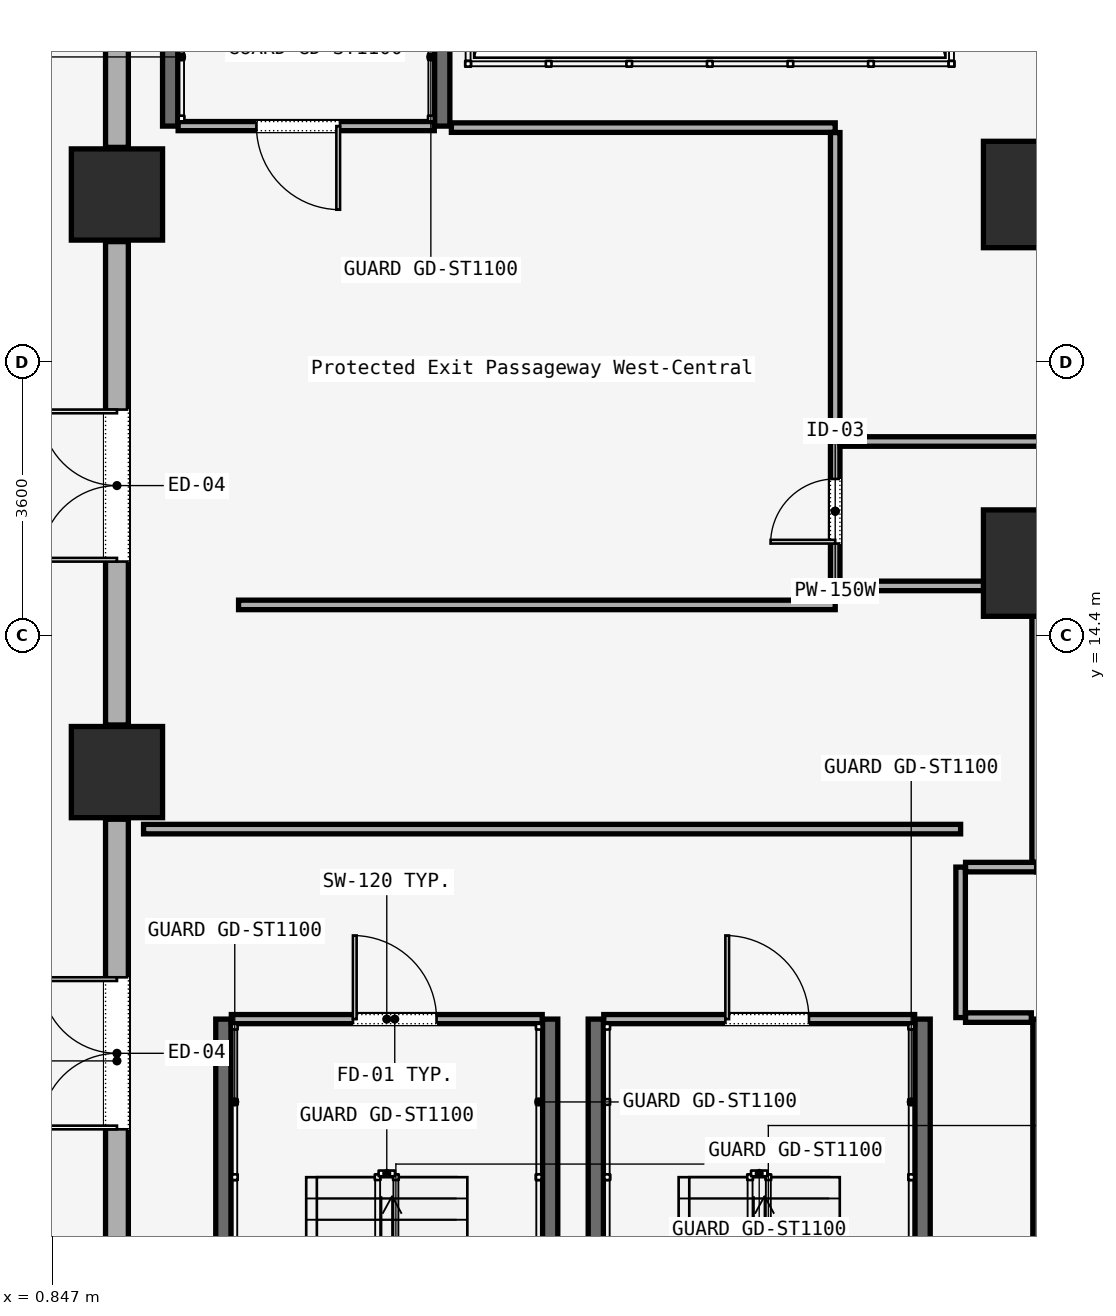
"""IFC4 building model, lengths in metres.
Left out: names, types, materials, properties, quantities, classifications, styles, units other than length and angle.
Written with IfcOpenShell. Run it as: python <this file> out.ifc"""

import sys

from ifc_helpers import new_model, si_unit, direction, frame, frame_2d, origin, origin_2d, place, context, subcontext, project, spatial, rectangle, extrude, element, fill, save


model = new_model("IFC4")
c1 = context("Model", 3, precision=1e-05, world=origin(), true_north=direction((0.0, 1.0)))
c2 = subcontext(c1, "Body", "Model", "MODEL_VIEW")
j1 = project(units=[si_unit("LENGTHUNIT", "METRE"), si_unit("PLANEANGLEUNIT", "RADIAN")], contexts=[c1])
p1 = place(None, origin())
s1 = spatial("IfcSite", under=j1, at=p1, CompositionType="ELEMENT")
p2 = place(p1, origin())
s2 = spatial("IfcBuilding", under=s1, at=p2, CompositionType="ELEMENT")
p3 = place(p2, origin())
s3 = spatial("IfcBuildingStorey", under=s2, at=p3, CompositionType="ELEMENT", Elevation=0.0)
for number, where, z_axis, x_axis in (
    (1, (1.7, 12.6, 0.0), (0.0, 0.0, 1.0), (1.0, 0.0, 0.0)),
    (2, (1.7, 20.2, 0.0), (0.0, 0.0, 1.0), (1.0, 0.0, 0.0)),
):
    element("IfcColumn", number, at=place(p3, frame(where, z_axis=z_axis, x_axis=x_axis)), inside=s3, PredefinedType="COLUMN", context=c2, shape_type="SweptSolid", body=[
        extrude(rectangle(XDim=1.2, YDim=1.2, at=origin_2d()), origin(), (0.0, 0.0, 1.0), 5.7),
    ])
for number, where, z_axis, x_axis in (
    (3, (13.8, 15.35, 0.0), (0.0, 0.0, 1.0), (1.0, 0.0, 0.0)),
    (4, (13.8, 20.2, 0.0), (0.0, 0.0, 1.0), (1.0, 0.0, 0.0)),
):
    element("IfcColumn", number, at=place(p3, frame(where, z_axis=z_axis, x_axis=x_axis)), inside=s3, PredefinedType="COLUMN", context=c2, shape_type="SweptSolid", body=[
        extrude(rectangle(XDim=1.4, YDim=1.4, at=origin_2d()), origin(), (0.0, 0.0, 1.0), 5.7),
    ])
p4 = place(p3, frame((1.7, 5.62, 0.0), z_axis=(0.0, 0.0, 1.0), x_axis=(0.0, 1.0, 0.0)))
e5 = element("IfcWall", 5, at=p4, inside=s3, PredefinedType="SOLIDWALL", context=c2, shape_type="SweptSolid", body=[
    extrude(rectangle(XDim=6.36, YDim=0.3, at=frame_2d((3.18, 0.0))), origin(), (0.0, 0.0, 1.0), 5.7),
])
p5 = place(p4, frame((2.28, 0.0, 0.0)))
e6 = element("IfcOpeningElement", 6, at=p5, cuts=e5, PredefinedType="OPENING", context=c2, shape_type="SweptSolid", body=[
    extrude(rectangle(XDim=2.0, YDim=2.3, at=frame_2d((1.0, 1.15))), frame((0.0, 0.15, 0.0), z_axis=(0.0, -1.0, 0.0), x_axis=(1.0, 0.0, 0.0)), (0.0, 0.0, 1.0), 0.3),
])
p6 = place(p3, frame((1.7, 13.22, 0.0), z_axis=(0.0, 0.0, 1.0), x_axis=(0.0, 1.0, 0.0)))
e7 = element("IfcWall", 7, at=p6, inside=s3, PredefinedType="SOLIDWALL", context=c2, shape_type="SweptSolid", body=[
    extrude(rectangle(XDim=6.36, YDim=0.3, at=frame_2d((3.18, 0.0))), origin(), (0.0, 0.0, 1.0), 5.7),
])
p7 = place(p6, frame((2.15, 0.0, 0.0)))
e8 = element("IfcOpeningElement", 8, at=p7, cuts=e7, PredefinedType="OPENING", context=c2, shape_type="SweptSolid", body=[
    extrude(rectangle(XDim=2.0, YDim=2.3, at=frame_2d((1.0, 1.15))), frame((0.0, 0.15, 0.0), z_axis=(0.0, -1.0, 0.0), x_axis=(1.0, 0.0, 0.0)), (0.0, 0.0, 1.0), 0.3),
])
p8 = place(p3, frame((1.7, 20.82, 0.0), z_axis=(0.0, 0.0, 1.0), x_axis=(0.0, 1.0, 0.0)))
e9 = element("IfcWall", 9, at=p8, inside=s3, PredefinedType="SOLIDWALL", context=c2, shape_type="SweptSolid", body=[
    extrude(rectangle(XDim=6.36, YDim=0.3, at=frame_2d((3.18, 0.0))), origin(), (0.0, 0.0, 1.0), 5.7),
])
for number, where, z_axis, x_axis in (
    (10, (3.1, 9.35, -0.4), (0.0, 0.0, 1.0), (0.0, -1.0, 0.0)),
    (11, (7.4, 9.35, -0.4), (0.0, 0.0, 1.0), (0.0, -1.0, 0.0)),
):
    element("IfcWall", number, at=place(p3, frame(where, z_axis=z_axis, x_axis=x_axis)), inside=s3, PredefinedType="SOLIDWALL", context=c2, shape_type="SweptSolid", body=[
        extrude(rectangle(XDim=8.5, YDim=0.2, at=frame_2d((4.25, 0.0))), origin(), (0.0, 0.0, 1.0), 6.4),
    ])
p9 = place(p3, frame((3.205, 9.35, 0.0), z_axis=(0.0, 0.0, 1.0), x_axis=(1.0, 0.0, 0.0)))
e12 = element("IfcWall", 12, at=p9, inside=s3, PredefinedType="SOLIDWALL", context=c2, shape_type="SweptSolid", body=[
    extrude(rectangle(XDim=4.09, YDim=0.12, at=frame_2d((2.045, 0.0))), origin(), (0.0, 0.0, 1.0), 3.6),
])
p10 = place(p9, frame((1.6, 0.0, 0.0)))
e13 = element("IfcOpeningElement", 13, at=p10, cuts=e12, PredefinedType="OPENING", context=c2, shape_type="SweptSolid", body=[
    extrude(rectangle(XDim=1.1, YDim=2.2, at=frame_2d((0.55, 1.1))), frame((0.0, 0.06, 0.0), z_axis=(0.0, -1.0, 0.0), x_axis=(1.0, 0.0, 0.0)), (0.0, 0.0, 1.0), 0.12),
])
for number, where, z_axis, x_axis in (
    (14, (8.0, 9.35, -0.4), (0.0, 0.0, 1.0), (0.0, -1.0, 0.0)),
    (15, (12.3, 9.35, -0.4), (0.0, 0.0, 1.0), (0.0, -1.0, 0.0)),
):
    element("IfcWall", number, at=place(p3, frame(where, z_axis=z_axis, x_axis=x_axis)), inside=s3, PredefinedType="SOLIDWALL", context=c2, shape_type="SweptSolid", body=[
        extrude(rectangle(XDim=8.5, YDim=0.2, at=frame_2d((4.25, 0.0))), origin(), (0.0, 0.0, 1.0), 6.4),
    ])
p11 = place(p3, frame((8.105, 9.35, 0.0), z_axis=(0.0, 0.0, 1.0), x_axis=(1.0, 0.0, 0.0)))
e16 = element("IfcWall", 16, at=p11, inside=s3, PredefinedType="SOLIDWALL", context=c2, shape_type="SweptSolid", body=[
    extrude(rectangle(XDim=4.09, YDim=0.12, at=frame_2d((2.045, 0.0))), origin(), (0.0, 0.0, 1.0), 3.6),
])
p12 = place(p11, frame((1.6, 0.0, 0.0)))
e17 = element("IfcOpeningElement", 17, at=p12, cuts=e16, PredefinedType="OPENING", context=c2, shape_type="SweptSolid", body=[
    extrude(rectangle(XDim=1.1, YDim=2.2, at=frame_2d((0.55, 1.1))), frame((0.0, 0.06, 0.0), z_axis=(0.0, -1.0, 0.0), x_axis=(1.0, 0.0, 0.0)), (0.0, 0.0, 1.0), 0.12),
])
p13 = place(p3, frame((13.85, 9.35, -0.4), z_axis=(0.0, 0.0, 1.0), x_axis=(0.0, -1.0, 0.0)))
e18 = element("IfcWall", 18, at=p13, inside=s3, PredefinedType="SOLIDWALL", context=c2, shape_type="SweptSolid", body=[
    extrude(rectangle(XDim=8.5, YDim=0.2, at=frame_2d((4.25, 0.0))), origin(), (0.0, 0.0, 1.0), 6.4),
])
for number, where, z_axis, x_axis in (
    (19, (5.98, 21.1, -0.4), (0.0, 0.0, 1.0), (0.0, 1.0, 0.0)),
    (20, (2.4, 21.1, -0.4), (0.0, 0.0, 1.0), (0.0, 1.0, 0.0)),
):
    element("IfcWall", number, at=place(p3, frame(where, z_axis=z_axis, x_axis=x_axis)), inside=s3, PredefinedType="SOLIDWALL", context=c2, shape_type="SweptSolid", body=[
        extrude(rectangle(XDim=7.95, YDim=0.2, at=frame_2d((3.975, 0.0))), origin(), (0.0, 0.0, 1.0), 6.4),
    ])
p14 = place(p3, frame((5.875, 21.1, 0.0), z_axis=(0.0, 0.0, 1.0), x_axis=(-1.0, 0.0, 0.0)))
e21 = element("IfcWall", 21, at=p14, inside=s3, PredefinedType="SOLIDWALL", context=c2, shape_type="SweptSolid", body=[
    extrude(rectangle(XDim=3.37, YDim=0.12, at=frame_2d((1.685, 0.0))), origin(), (0.0, 0.0, 1.0), 3.6),
])
p15 = place(p14, frame((1.24, 0.0, 0.0)))
e22 = element("IfcOpeningElement", 22, at=p15, cuts=e21, PredefinedType="OPENING", context=c2, shape_type="SweptSolid", body=[
    extrude(rectangle(XDim=1.1, YDim=2.2, at=frame_2d((0.55, 1.1))), frame((0.0, 0.06, 0.0), z_axis=(0.0, -1.0, 0.0), x_axis=(1.0, 0.0, 0.0)), (0.0, 0.0, 1.0), 0.12),
])
p16 = place(p3, frame((13.8, 15.05, 0.0), z_axis=(0.0, 0.0, 1.0), x_axis=(-1.0, 0.0, 0.0)))
e23 = element("IfcWall", 23, at=p16, inside=s3, PredefinedType="PARTITIONING", context=c2, shape_type="SweptSolid", body=[
    extrude(rectangle(XDim=2.65, YDim=0.125, at=frame_2d((1.325, 0.0))), origin(), (0.0, 0.0, 1.0), 3.6),
])
p17 = place(p3, frame((11.15, 15.115, 0.0), z_axis=(0.0, 0.0, 1.0), x_axis=(0.0, 1.0, 0.0)))
e24 = element("IfcWall", 24, at=p17, inside=s3, PredefinedType="PARTITIONING", context=c2, shape_type="SweptSolid", body=[
    extrude(rectangle(XDim=1.835, YDim=0.125, at=frame_2d((0.917, 0.0))), origin(), (0.0, 0.0, 1.0), 3.6),
])
p18 = place(p17, frame((0.492, 0.0, 0.0)))
e25 = element("IfcOpeningElement", 25, at=p18, cuts=e24, PredefinedType="OPENING", context=c2, shape_type="SweptSolid", body=[
    extrude(rectangle(XDim=0.85, YDim=2.15, at=frame_2d((0.425, 1.075))), frame((0.0, 0.062, 0.0), z_axis=(0.0, -1.0, 0.0), x_axis=(1.0, 0.0, 0.0)), (0.0, 0.0, 1.0), 0.125),
])
p19 = place(p3, frame((11.215, 16.95, 0.0), z_axis=(0.0, 0.0, 1.0), x_axis=(1.0, 0.0, 0.0)))
e26 = element("IfcWall", 26, at=p19, inside=s3, PredefinedType="PARTITIONING", context=c2, shape_type="SweptSolid", body=[
    extrude(rectangle(XDim=3.265, YDim=0.125, at=frame_2d((1.632, 0.0))), origin(), (0.0, 0.0, 1.0), 3.6),
])
p20 = place(p3, frame((2.05, 11.85, 0.0), z_axis=(0.0, 0.0, 1.0), x_axis=(1.0, 0.0, 0.0)))
e27 = element("IfcWall", 27, at=p20, inside=s3, PredefinedType="PARTITIONING", context=c2, shape_type="SweptSolid", body=[
    extrude(rectangle(XDim=10.75, YDim=0.125, at=frame_2d((5.375, 0.0))), origin(), (0.0, 0.0, 1.0), 3.6),
])
p21 = place(p3, frame((12.8, 11.35, 0.0), z_axis=(0.0, 0.0, 1.0), x_axis=(0.0, -1.0, 0.0)))
e28 = element("IfcWall", 28, at=p21, inside=s3, PredefinedType="PARTITIONING", context=c2, shape_type="SweptSolid", body=[
    extrude(rectangle(XDim=1.98, YDim=0.125, at=frame_2d((0.99, 0.0))), origin(), (0.0, 0.0, 1.0), 3.6),
])
p22 = place(p3, frame((13.73, 9.37, 0.0), z_axis=(0.0, 0.0, 1.0), x_axis=(-1.0, 0.0, 0.0)))
e29 = element("IfcWall", 29, at=p22, inside=s3, PredefinedType="PARTITIONING", context=c2, shape_type="SweptSolid", body=[
    extrude(rectangle(XDim=0.865, YDim=0.125, at=frame_2d((0.433, 0.0))), origin(), (0.0, 0.0, 1.0), 3.6),
])
p23 = place(p3, frame((12.865, 11.35, 0.0), z_axis=(0.0, 0.0, 1.0), x_axis=(1.0, 0.0, 0.0)))
e30 = element("IfcWall", 30, at=p23, inside=s3, PredefinedType="PARTITIONING", context=c2, shape_type="SweptSolid", body=[
    extrude(rectangle(XDim=0.935, YDim=0.125, at=frame_2d((0.468, 0.0))), origin(), (0.0, 0.0, 1.0), 3.6),
])
p24 = place(p3, frame((11.15, 14.8, 0.0), z_axis=(0.0, 0.0, 1.0), x_axis=(-1.0, 0.0, 0.0)))
e31 = element("IfcWall", 31, at=p24, inside=s3, PredefinedType="PARTITIONING", context=c2, shape_type="SweptSolid", body=[
    extrude(rectangle(XDim=7.85, YDim=0.125, at=frame_2d((3.925, 0.0))), origin(), (0.0, 0.0, 1.0), 3.6),
])
p25 = place(p3, frame((6.1, 21.08, 0.0), z_axis=(0.0, 0.0, 1.0), x_axis=(1.0, 0.0, 0.0)))
e32 = element("IfcWall", 32, at=p25, inside=s3, PredefinedType="PARTITIONING", context=c2, shape_type="SweptSolid", body=[
    extrude(rectangle(XDim=5.05, YDim=0.125, at=frame_2d((2.525, 0.0))), origin(), (0.0, 0.0, 1.0), 3.6),
])
p26 = place(p3, frame((11.15, 21.015, 0.0), z_axis=(0.0, 0.0, 1.0), x_axis=(0.0, -1.0, 0.0)))
e33 = element("IfcWall", 33, at=p26, inside=s3, PredefinedType="PARTITIONING", context=c2, shape_type="SweptSolid", body=[
    extrude(rectangle(XDim=4.065, YDim=0.125, at=frame_2d((2.032, 0.0))), origin(), (0.0, 0.0, 1.0), 3.6),
])
p27 = place(p3, frame((13.8, 11.415, 0.0), z_axis=(0.0, 0.0, 1.0), x_axis=(0.0, 1.0, 0.0)))
e34 = element("IfcWall", 34, at=p27, inside=s3, PredefinedType="PARTITIONING", context=c2, shape_type="SweptSolid", body=[
    extrude(rectangle(XDim=3.57, YDim=0.125, at=frame_2d((1.785, 0.0))), origin(), (0.0, 0.0, 1.0), 3.6),
])
p28 = place(p5, origin())
e35 = element("IfcDoor", 35, at=p28, inside=s3, OperationType="DOUBLE_DOOR_SINGLE_SWING", PredefinedType="DOOR", context=c2, shape_type="SweptSolid", body=[
    extrude(rectangle(XDim=2.0, YDim=2.3, at=frame_2d((1.0, 1.15))), frame((0.0, 0.025, 0.0), z_axis=(0.0, -1.0, 0.0), x_axis=(1.0, 0.0, 0.0)), (0.0, 0.0, 1.0), 0.05),
])
fill(e6, e35)
p29 = place(p7, origin())
e36 = element("IfcDoor", 36, at=p29, inside=s3, OperationType="DOUBLE_DOOR_SINGLE_SWING", PredefinedType="DOOR", context=c2, shape_type="SweptSolid", body=[
    extrude(rectangle(XDim=2.0, YDim=2.3, at=frame_2d((1.0, 1.15))), frame((0.0, 0.025, 0.0), z_axis=(0.0, -1.0, 0.0), x_axis=(1.0, 0.0, 0.0)), (0.0, 0.0, 1.0), 0.05),
])
fill(e8, e36)
p30 = place(p10, origin())
e37 = element("IfcDoor", 37, at=p30, inside=s3, OperationType="SINGLE_SWING_LEFT", PredefinedType="DOOR", context=c2, shape_type="SweptSolid", body=[
    extrude(rectangle(XDim=1.1, YDim=2.2, at=frame_2d((0.55, 1.1))), frame((0.0, 0.025, 0.0), z_axis=(0.0, -1.0, 0.0), x_axis=(1.0, 0.0, 0.0)), (0.0, 0.0, 1.0), 0.05),
])
fill(e13, e37)
p31 = place(p12, origin())
e38 = element("IfcDoor", 38, at=p31, inside=s3, OperationType="SINGLE_SWING_LEFT", PredefinedType="DOOR", context=c2, shape_type="SweptSolid", body=[
    extrude(rectangle(XDim=1.1, YDim=2.2, at=frame_2d((0.55, 1.1))), frame((0.0, 0.025, 0.0), z_axis=(0.0, -1.0, 0.0), x_axis=(1.0, 0.0, 0.0)), (0.0, 0.0, 1.0), 0.05),
])
fill(e17, e38)
p32 = place(p15, origin())
e39 = element("IfcDoor", 39, at=p32, inside=s3, OperationType="SINGLE_SWING_LEFT", PredefinedType="DOOR", context=c2, shape_type="SweptSolid", body=[
    extrude(rectangle(XDim=1.1, YDim=2.2, at=frame_2d((0.55, 1.1))), frame((0.0, 0.025, 0.0), z_axis=(0.0, -1.0, 0.0), x_axis=(1.0, 0.0, 0.0)), (0.0, 0.0, 1.0), 0.05),
])
fill(e22, e39)
p33 = place(p18, origin())
e40 = element("IfcDoor", 40, at=p33, inside=s3, OperationType="SINGLE_SWING_LEFT", PredefinedType="DOOR", context=c2, shape_type="SweptSolid", body=[
    extrude(rectangle(XDim=0.85, YDim=2.15, at=frame_2d((0.425, 1.075))), frame((0.0, 0.025, 0.0), z_axis=(0.0, -1.0, 0.0), x_axis=(1.0, 0.0, 0.0)), (0.0, 0.0, 1.0), 0.05),
])
fill(e25, e40)
save(model, sys.argv[1])
